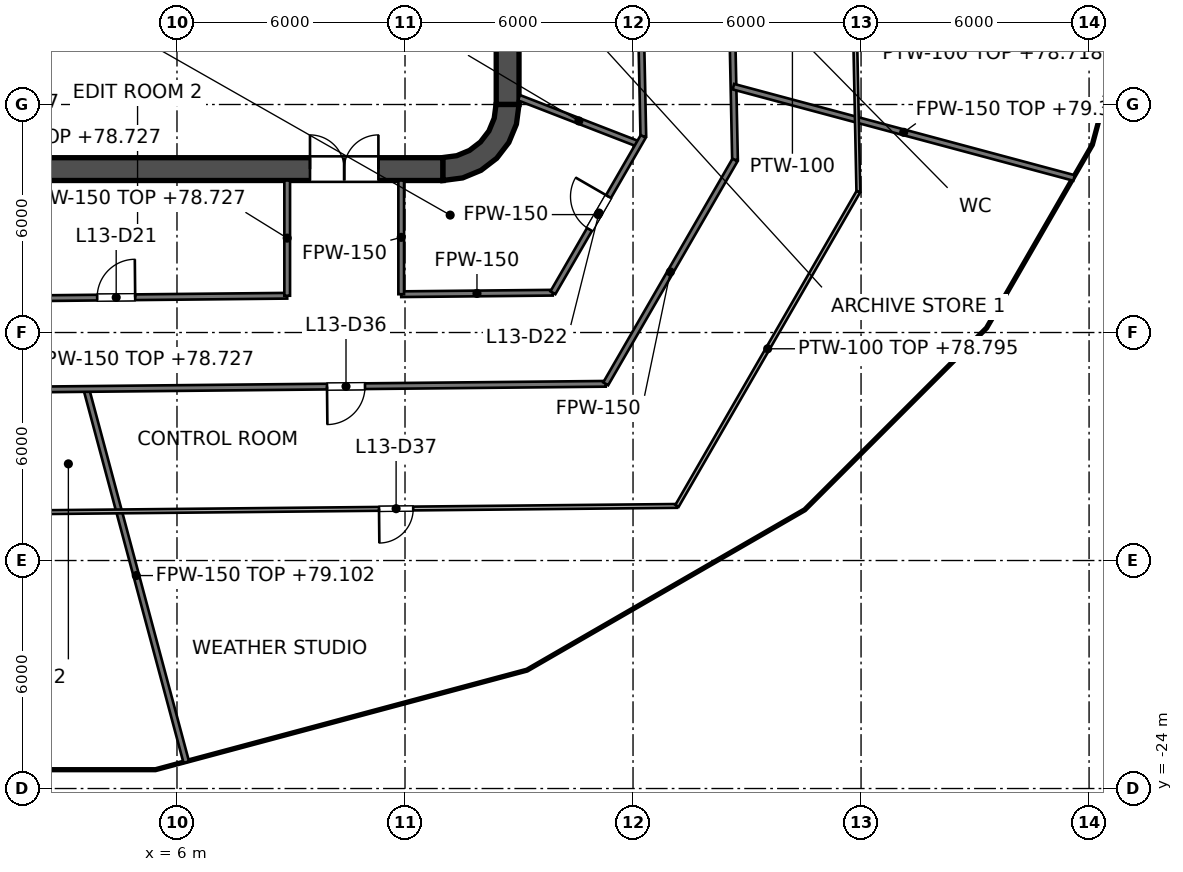
"""IFC4 building model, lengths in metres.
Left out: names, types, materials, properties, quantities, classifications, styles, units other than length and angle.
Written with IfcOpenShell. Run it as: python <this file> out.ifc"""

import sys

from ifc_helpers import new_model, si_unit, direction, frame, frame_2d, origin, place, context, subcontext, project, spatial, polyline, rectangle, outline, extrude, element, fill, save


model = new_model("IFC4")
c1 = context("Model", 3, precision=1e-05, world=origin(), true_north=direction((0.0, 1.0)))
c2 = subcontext(c1, "Body", "Model", "MODEL_VIEW")
j1 = project(units=[si_unit("LENGTHUNIT", "METRE"), si_unit("PLANEANGLEUNIT", "RADIAN")], contexts=[c1])
p1 = place(None, origin())
s1 = spatial("IfcSite", under=j1, at=p1, CompositionType="ELEMENT")
p2 = place(p1, origin())
s2 = spatial("IfcBuilding", under=s1, at=p2, CompositionType="ELEMENT")
p3 = place(p2, frame((0.0, 0.0, 75.6)))
s3 = spatial("IfcBuildingStorey", under=s2, at=p3, CompositionType="ELEMENT", Elevation=75.6)
p4 = place(p3, frame((-13.0, -7.7, 0.0), z_axis=(0.0, 0.0, 1.0), x_axis=(1.0, 0.0, 0.0)))
e1 = element("IfcWall", 1, at=p4, inside=s3, PredefinedType="SHEAR", context=c2, shape_type="SweptSolid", body=[
    extrude(rectangle(XDim=26.0, YDim=0.6, at=frame_2d((13.0, 0.0))), origin(), (0.0, 0.0, 1.0), 4.2),
])
p5 = place(p4, frame((1.7, 0.0, 0.0)))
e2 = element("IfcOpeningElement", 2, at=p5, cuts=e1, PredefinedType="OPENING", context=c2, shape_type="SweptSolid", body=[
    extrude(rectangle(XDim=1.8, YDim=2.1, at=frame_2d((0.9, 1.05))), frame((0.0, 0.3, 0.0), z_axis=(0.0, -1.0, 0.0), x_axis=(1.0, 0.0, 0.0)), (0.0, 0.0, 1.0), 0.6),
])
p6 = place(p4, frame((22.5, 0.0, 0.0)))
e3 = element("IfcOpeningElement", 3, at=p6, cuts=e1, PredefinedType="OPENING", context=c2, shape_type="SweptSolid", body=[
    extrude(rectangle(XDim=1.8, YDim=2.1, at=frame_2d((0.9, 1.05))), frame((0.0, 0.3, 0.0), z_axis=(0.0, -1.0, 0.0), x_axis=(1.0, 0.0, 0.0)), (0.0, 0.0, 1.0), 0.6),
])
p7 = place(p3, frame((14.7, -6.0, 0.0), z_axis=(0.0, 0.0, 1.0), x_axis=(0.0, 1.0, 0.0)))
e4 = element("IfcWall", 4, at=p7, inside=s3, PredefinedType="SHEAR", context=c2, shape_type="SweptSolid", body=[
    extrude(rectangle(XDim=12.0, YDim=0.6, at=frame_2d((6.0, 0.0))), origin(), (0.0, 0.0, 1.0), 4.2),
])
p8 = place(p3, origin())
e5 = element("IfcWall", 5, at=p8, inside=s3, PredefinedType="SHEAR", context=c2, shape_type="SweptSolid", body=[
    extrude(outline(polyline([(15.0, -6.0), (14.395, -6.0), (14.347, -6.361), (14.208, -6.698), (13.986, -6.986), (13.698, -7.208), (13.361, -7.347), (13.0, -7.395), (13.0, -8.0), (13.518, -7.932), (14.0, -7.732), (14.414, -7.414), (14.732, -7.0), (14.932, -6.518), (15.0, -6.0)])), origin(), (0.0, 0.0, 1.0), 4.2),
])
p9 = place(p3, frame((9.0, -6.6, 0.0), z_axis=(0.0, 0.0, 1.0), x_axis=(0.0, 1.0, 0.0)))
e6 = element("IfcWall", 6, at=p9, inside=s3, PredefinedType="SOLIDWALL", context=c2, shape_type="SweptSolid", body=[
    extrude(rectangle(XDim=2.5, YDim=0.25, at=frame_2d((1.25, 0.0))), origin(), (0.0, 0.0, 1.0), 4.05),
])
p10 = place(p9, frame((0.65, 0.0, 0.0)))
e7 = element("IfcOpeningElement", 7, at=p10, cuts=e6, PredefinedType="OPENING", context=c2, shape_type="SweptSolid", body=[
    extrude(rectangle(XDim=1.2, YDim=2.1, at=frame_2d((0.6, 1.05))), frame((0.0, 0.125, 0.0), z_axis=(0.0, -1.0, 0.0), x_axis=(1.0, 0.0, 0.0)), (0.0, 0.0, 1.0), 0.25),
])
p11 = place(p3, frame((3.15, -6.6, 0.0), z_axis=(0.0, 0.0, 1.0), x_axis=(0.0, 1.0, 0.0)))
e8 = element("IfcWall", 8, at=p11, inside=s3, PredefinedType="SOLIDWALL", context=c2, shape_type="SweptSolid", body=[
    extrude(rectangle(XDim=2.5, YDim=0.25, at=frame_2d((1.25, 0.0))), origin(), (0.0, 0.0, 1.0), 4.05),
])
p12 = place(p3, frame((-9.125, -7.0, 0.0), z_axis=(0.0, 0.0, 1.0), x_axis=(1.0, 0.0, 0.0)))
e9 = element("IfcWall", 9, at=p12, inside=s3, PredefinedType="SOLIDWALL", context=c2, shape_type="SweptSolid", body=[
    extrude(rectangle(XDim=18.25, YDim=0.8, at=frame_2d((9.125, 0.0))), origin(), (0.0, 0.0, 1.0), 4.05),
])
p13 = place(p3, frame((11.8, -7.4, 0.0), z_axis=(0.0, 0.0, 1.0), x_axis=(0.0, 1.0, 0.0)))
e10 = element("IfcWall", 10, at=p13, inside=s3, PredefinedType="SOLIDWALL", context=c2, shape_type="SweptSolid", body=[
    extrude(rectangle(XDim=14.8, YDim=0.4, at=frame_2d((7.4, 0.0))), origin(), (0.0, 0.0, 1.0), 4.05),
])
p14 = place(p13, frame((11.2, 0.0, 0.0)))
e11 = element("IfcOpeningElement", 11, at=p14, cuts=e10, PredefinedType="OPENING", context=c2, shape_type="SweptSolid", body=[
    extrude(rectangle(XDim=1.1, YDim=2.1, at=frame_2d((0.55, 1.05))), frame((0.0, 0.2, 0.0), z_axis=(0.0, -1.0, 0.0), x_axis=(1.0, 0.0, 0.0)), (0.0, 0.0, 1.0), 0.4),
])
p15 = place(p13, frame((8.3, 0.0, 0.0)))
e12 = element("IfcOpeningElement", 12, at=p15, cuts=e10, PredefinedType="OPENING", context=c2, shape_type="SweptSolid", body=[
    extrude(rectangle(XDim=1.1, YDim=2.1, at=frame_2d((0.55, 1.05))), frame((0.0, 0.2, 0.0), z_axis=(0.0, -1.0, 0.0), x_axis=(1.0, 0.0, 0.0)), (0.0, 0.0, 1.0), 0.4),
])
p16 = place(p13, frame((5.4, 0.0, 0.0)))
e13 = element("IfcOpeningElement", 13, at=p16, cuts=e10, PredefinedType="OPENING", context=c2, shape_type="SweptSolid", body=[
    extrude(rectangle(XDim=1.1, YDim=2.1, at=frame_2d((0.55, 1.05))), frame((0.0, 0.2, 0.0), z_axis=(0.0, -1.0, 0.0), x_axis=(1.0, 0.0, 0.0)), (0.0, 0.0, 1.0), 0.4),
])
p17 = place(p13, frame((13.552, 0.0, 0.0)))
e14 = element("IfcOpeningElement", 14, at=p17, cuts=e10, PredefinedType="OPENING", context=c2, shape_type="SweptSolid", body=[
    extrude(rectangle(XDim=0.9, YDim=2.1, at=frame_2d((0.45, 1.05))), frame((0.0, 0.2, 0.0), z_axis=(0.0, -1.0, 0.0), x_axis=(1.0, 0.0, 0.0)), (0.0, 0.0, 1.0), 0.4),
])
p18 = place(p13, frame((0.347, 0.0, 0.0)))
e15 = element("IfcOpeningElement", 15, at=p18, cuts=e10, PredefinedType="OPENING", context=c2, shape_type="SweptSolid", body=[
    extrude(rectangle(XDim=0.9, YDim=2.1, at=frame_2d((0.45, 1.05))), frame((0.0, 0.2, 0.0), z_axis=(0.0, -1.0, 0.0), x_axis=(1.0, 0.0, 0.0)), (0.0, 0.0, 1.0), 0.4),
])
e16 = element("IfcWall", 16, at=p8, inside=s3, PredefinedType="SOLIDWALL", context=c2, shape_type="SweptSolid", body=[
    extrude(outline(polyline([(12.0, -5.675), (12.0, -5.925), (14.15, -5.925), (14.4, -5.925), (14.4, -5.675), (14.4, -3.025), (14.4, -2.775), (14.4, -0.125), (14.4, 0.125), (14.4, 2.775), (14.4, 3.025), (14.4, 5.675), (14.4, 5.925), (14.15, 5.925), (12.0, 5.925), (12.0, 5.675), (14.15, 5.675), (14.15, 3.025), (12.0, 3.025), (12.0, 2.775), (14.15, 2.775), (14.15, 0.125), (12.0, 0.125), (12.0, -0.125), (14.15, -0.125), (14.15, -2.775), (12.0, -2.775), (12.0, -3.025), (14.15, -3.025), (14.15, -5.675), (12.0, -5.675)])), origin(), (0.0, 0.0, 1.0), 4.05),
])
p19 = place(p3, frame((17.944, 8.899, 0.0), z_axis=(0.0, 0.0, 1.0), x_axis=(0.020766159807, -0.999784360053, 0.0)))
e17 = element("IfcWall", 17, at=p19, inside=s3, PredefinedType="PARTITIONING", context=c2, shape_type="SweptSolid", body=[
    extrude(rectangle(XDim=15.742, YDim=0.15, at=frame_2d((7.871, 0.0))), origin(), (0.0, 0.0, 1.0), 3.118),
])
p20 = place(p19, frame((11.72, 0.0, 0.0)))
e18 = element("IfcOpeningElement", 18, at=p20, cuts=e17, PredefinedType="OPENING", context=c2, shape_type="SweptSolid", body=[
    extrude(rectangle(XDim=1.0, YDim=2.1, at=frame_2d((0.5, 1.05))), frame((0.0, 0.075, 0.0), z_axis=(0.0, -1.0, 0.0), x_axis=(1.0, 0.0, 0.0)), (0.0, 0.0, 1.0), 0.15),
])
p21 = place(p19, frame((7.533, 0.0, 0.0)))
e19 = element("IfcOpeningElement", 19, at=p21, cuts=e17, PredefinedType="OPENING", context=c2, shape_type="SweptSolid", body=[
    extrude(rectangle(XDim=1.0, YDim=2.1, at=frame_2d((0.5, 1.05))), frame((0.0, 0.075, 0.0), z_axis=(0.0, -1.0, 0.0), x_axis=(1.0, 0.0, 0.0)), (0.0, 0.0, 1.0), 0.15),
])
p22 = place(p3, frame((20.314, 10.301, 0.0), z_axis=(0.0, 0.0, 1.0), x_axis=(0.020779303351, -0.999784086967, 0.0)))
e20 = element("IfcWall", 20, at=p22, inside=s3, PredefinedType="PARTITIONING", context=c2, shape_type="SweptSolid", body=[
    extrude(rectangle(XDim=17.765, YDim=0.15, at=frame_2d((8.882, 0.0))), origin(), (0.0, 0.0, 1.0), 3.118),
])
p23 = place(p22, frame((13.714, 0.0, 0.0)))
e21 = element("IfcOpeningElement", 21, at=p23, cuts=e20, PredefinedType="OPENING", context=c2, shape_type="SweptSolid", body=[
    extrude(rectangle(XDim=1.0, YDim=2.1, at=frame_2d((0.5, 1.05))), frame((0.0, 0.075, 0.0), z_axis=(0.0, -1.0, 0.0), x_axis=(1.0, 0.0, 0.0)), (0.0, 0.0, 1.0), 0.15),
])
p24 = place(p22, frame((5.797, 0.0, 0.0)))
e22 = element("IfcOpeningElement", 22, at=p24, cuts=e20, PredefinedType="OPENING", context=c2, shape_type="SweptSolid", body=[
    extrude(rectangle(XDim=1.0, YDim=2.1, at=frame_2d((0.5, 1.05))), frame((0.0, 0.075, 0.0), z_axis=(0.0, -1.0, 0.0), x_axis=(1.0, 0.0, 0.0)), (0.0, 0.0, 1.0), 0.15),
])
p25 = place(p3, frame((3.613, -13.485, 0.0), z_axis=(0.0, 0.0, 1.0), x_axis=(0.258799691225, -0.965931011937, 0.0)))
e23 = element("IfcWall", 23, at=p25, inside=s3, PredefinedType="PARTITIONING", context=c2, shape_type="SweptSolid", body=[
    extrude(rectangle(XDim=10.168, YDim=0.15, at=frame_2d((5.084, 0.0))), origin(), (0.0, 0.0, 1.0), 3.502),
])
p26 = place(p3, frame((15.0, -5.822, 0.0), z_axis=(0.0, 0.0, 1.0), x_axis=(0.932341922019, -0.36157784839, 0.0)))
e24 = element("IfcWall", 24, at=p26, inside=s3, PredefinedType="PARTITIONING", context=c2, shape_type="SweptSolid", body=[
    extrude(rectangle(XDim=3.379, YDim=0.15, at=frame_2d((1.689, 0.0))), origin(), (0.0, 0.0, 1.0), 4.05),
])
p27 = place(p3, frame((20.641, -5.531, 0.0), z_axis=(0.0, 0.0, 1.0), x_axis=(0.965912819534, -0.258867582095, 0.0)))
e25 = element("IfcWall", 25, at=p27, inside=s3, PredefinedType="PARTITIONING", context=c2, shape_type="SweptSolid", body=[
    extrude(rectangle(XDim=9.28, YDim=0.15, at=frame_2d((4.64, 0.0))), origin(), (0.0, 0.0, 1.0), 3.727),
])
p28 = place(p3, frame((-14.097, -13.661, 0.0), z_axis=(0.0, 0.0, 1.0), x_axis=(0.999950951425, 0.009904279054, 0.0)))
e26 = element("IfcWall", 26, at=p28, inside=s3, PredefinedType="PARTITIONING", context=c2, shape_type="SweptSolid", body=[
    extrude(rectangle(XDim=31.379, YDim=0.15, at=frame_2d((15.69, 0.0))), origin(), (0.0, 0.0, 1.0), 3.127),
])
p29 = place(p28, frame((7.45, 0.0, 0.0)))
e27 = element("IfcOpeningElement", 27, at=p29, cuts=e26, PredefinedType="OPENING", context=c2, shape_type="SweptSolid", body=[
    extrude(rectangle(XDim=1.0, YDim=2.1, at=frame_2d((0.5, 1.05))), frame((0.0, 0.075, 0.0), z_axis=(0.0, -1.0, 0.0), x_axis=(1.0, 0.0, 0.0)), (0.0, 0.0, 1.0), 0.15),
])
p30 = place(p28, frame((14.692, 0.0, 0.0)))
e28 = element("IfcOpeningElement", 28, at=p30, cuts=e26, PredefinedType="OPENING", context=c2, shape_type="SweptSolid", body=[
    extrude(rectangle(XDim=1.0, YDim=2.1, at=frame_2d((0.5, 1.05))), frame((0.0, 0.075, 0.0), z_axis=(0.0, -1.0, 0.0), x_axis=(1.0, 0.0, 0.0)), (0.0, 0.0, 1.0), 0.15),
])
p31 = place(p28, frame((24.046, 0.0, 0.0)))
e29 = element("IfcOpeningElement", 29, at=p31, cuts=e26, PredefinedType="OPENING", context=c2, shape_type="SweptSolid", body=[
    extrude(rectangle(XDim=1.0, YDim=2.1, at=frame_2d((0.5, 1.05))), frame((0.0, 0.075, 0.0), z_axis=(0.0, -1.0, 0.0), x_axis=(1.0, 0.0, 0.0)), (0.0, 0.0, 1.0), 0.15),
])
p32 = place(p3, frame((-8.9, -11.209, 0.0), z_axis=(0.0, 0.0, 1.0), x_axis=(0.999950969978, 0.009902405776, 0.0)))
e30 = element("IfcWall", 30, at=p32, inside=s3, PredefinedType="PARTITIONING", context=c2, shape_type="SweptSolid", body=[
    extrude(rectangle(XDim=17.801, YDim=0.15, at=frame_2d((8.9, 0.0))), origin(), (0.0, 0.0, 1.0), 3.127),
])
p33 = place(p32, frame((7.7, 0.0, 0.0)))
e31 = element("IfcOpeningElement", 31, at=p33, cuts=e30, PredefinedType="OPENING", context=c2, shape_type="SweptSolid", body=[
    extrude(rectangle(XDim=1.0, YDim=2.1, at=frame_2d((0.5, 1.05))), frame((0.0, 0.075, 0.0), z_axis=(0.0, -1.0, 0.0), x_axis=(1.0, 0.0, 0.0)), (0.0, 0.0, 1.0), 0.15),
])
p34 = place(p32, frame((12.801, 0.0, 0.0)))
e32 = element("IfcOpeningElement", 32, at=p34, cuts=e30, PredefinedType="OPENING", context=c2, shape_type="SweptSolid", body=[
    extrude(rectangle(XDim=1.0, YDim=2.1, at=frame_2d((0.5, 1.05))), frame((0.0, 0.075, 0.0), z_axis=(0.0, -1.0, 0.0), x_axis=(1.0, 0.0, 0.0)), (0.0, 0.0, 1.0), 0.15),
])
p35 = place(p3, frame((11.9, -10.992, 0.0), z_axis=(0.0, 0.0, 1.0), x_axis=(0.999950802569, 0.009919296431, 0.0)))
e33 = element("IfcWall", 33, at=p35, inside=s3, PredefinedType="PARTITIONING", context=c2, shape_type="SweptSolid", body=[
    extrude(rectangle(XDim=3.987, YDim=0.15, at=frame_2d((1.994, 0.0))), origin(), (0.0, 0.0, 1.0), 3.195),
])
p36 = place(p3, frame((17.281, -13.35, 0.0), z_axis=(0.0, 0.0, 1.0), x_axis=(0.500235133997, 0.865889606541, 0.0)))
e34 = element("IfcWall", 34, at=p36, inside=s3, PredefinedType="PARTITIONING", context=c2, shape_type="SweptSolid", body=[
    extrude(rectangle(XDim=6.801, YDim=0.15, at=frame_2d((3.4, 0.0))), origin(), (0.0, 0.0, 1.0), 3.195),
])
p37 = place(p3, frame((15.892, -10.954, 0.0), z_axis=(0.0, 0.0, 1.0), x_axis=(0.50019540779, 0.865912555646, 0.0)))
e35 = element("IfcWall", 35, at=p37, inside=s3, PredefinedType="PARTITIONING", context=c2, shape_type="SweptSolid", body=[
    extrude(rectangle(XDim=4.751, YDim=0.15, at=frame_2d((2.375, 0.0))), origin(), (0.0, 0.0, 1.0), 3.195),
])
p38 = place(p37, frame((1.924, 0.0, 0.0)))
e36 = element("IfcOpeningElement", 36, at=p38, cuts=e35, PredefinedType="OPENING", context=c2, shape_type="SweptSolid", body=[
    extrude(rectangle(XDim=1.0, YDim=2.1, at=frame_2d((0.5, 1.05))), frame((0.0, 0.075, 0.0), z_axis=(0.0, -1.0, 0.0), x_axis=(1.0, 0.0, 0.0)), (0.0, 0.0, 1.0), 0.15),
])
p39 = place(p3, frame((11.9, -10.992, 0.0), z_axis=(0.0, 0.0, 1.0), x_axis=(0.0, 1.0, 0.0)))
e37 = element("IfcWall", 37, at=p39, inside=s3, PredefinedType="PARTITIONING", context=c2, shape_type="SweptSolid", body=[
    extrude(rectangle(XDim=2.992, YDim=0.15, at=frame_2d((1.496, 0.0))), origin(), (0.0, 0.0, 1.0), 3.195),
])
p40 = place(p3, frame((8.9, -11.032, 0.0), z_axis=(0.0, 0.0, 1.0), x_axis=(0.0, 1.0, 0.0)))
e38 = element("IfcWall", 38, at=p40, inside=s3, PredefinedType="PARTITIONING", context=c2, shape_type="SweptSolid", body=[
    extrude(rectangle(XDim=3.032, YDim=0.15, at=frame_2d((1.516, 0.0))), origin(), (0.0, 0.0, 1.0), 3.127),
])
p41 = place(p3, frame((23.629, 6.283, 0.0), z_axis=(0.0, 0.0, 1.0), x_axis=(0.020596229696, -0.999787875163, 0.0)))
e39 = element("IfcWall", 39, at=p41, inside=s3, PredefinedType="PARTITIONING", context=c2, shape_type="SweptSolid", body=[
    extrude(rectangle(XDim=14.58, YDim=0.1, at=frame_2d((7.29, 0.0))), origin(), (0.0, 0.0, 1.0), 3.118),
])
p42 = place(p41, frame((4.424, 0.0, 0.0)))
e40 = element("IfcOpeningElement", 40, at=p42, cuts=e39, PredefinedType="OPENING", context=c2, shape_type="SweptSolid", body=[
    extrude(rectangle(XDim=0.9, YDim=2.1, at=frame_2d((0.45, 1.05))), frame((0.0, 0.05, 0.0), z_axis=(0.0, -1.0, 0.0), x_axis=(1.0, 0.0, 0.0)), (0.0, 0.0, 1.0), 0.1),
])
p43 = place(p3, frame((-14.724, -16.897, 0.0), z_axis=(0.0, 0.0, 1.0), x_axis=(0.999951488976, 0.00984985758, 0.0)))
e41 = element("IfcWall", 41, at=p43, inside=s3, PredefinedType="PARTITIONING", context=c2, shape_type="SweptSolid", body=[
    extrude(rectangle(XDim=33.883, YDim=0.1, at=frame_2d((16.941, 0.0))), origin(), (0.0, 0.0, 1.0), 3.127),
])
p44 = place(p43, frame((6.095, 0.0, 0.0)))
e42 = element("IfcOpeningElement", 42, at=p44, cuts=e41, PredefinedType="OPENING", context=c2, shape_type="SweptSolid", body=[
    extrude(rectangle(XDim=1.8, YDim=2.1, at=frame_2d((0.9, 1.05))), frame((0.0, 0.05, 0.0), z_axis=(0.0, -1.0, 0.0), x_axis=(1.0, 0.0, 0.0)), (0.0, 0.0, 1.0), 0.1),
])
p45 = place(p43, frame((26.041, 0.0, 0.0)))
e43 = element("IfcOpeningElement", 43, at=p45, cuts=e41, PredefinedType="OPENING", context=c2, shape_type="SweptSolid", body=[
    extrude(rectangle(XDim=0.9, YDim=2.1, at=frame_2d((0.45, 1.05))), frame((0.0, 0.05, 0.0), z_axis=(0.0, -1.0, 0.0), x_axis=(1.0, 0.0, 0.0)), (0.0, 0.0, 1.0), 0.1),
])
p46 = place(p3, frame((19.157, -16.562, 0.0), z_axis=(0.0, 0.0, 1.0), x_axis=(0.499904728141, 0.866080402031, 0.0)))
e44 = element("IfcWall", 44, at=p46, inside=s3, PredefinedType="PARTITIONING", context=c2, shape_type="SweptSolid", body=[
    extrude(rectangle(XDim=9.546, YDim=0.1, at=frame_2d((4.773, 0.0))), origin(), (0.0, 0.0, 1.0), 3.195),
])
p47 = place(p10, origin())
e45 = element("IfcDoor", 45, at=p47, inside=s3, OperationType="SINGLE_SWING_LEFT", PredefinedType="DOOR", context=c2, shape_type="SweptSolid", body=[
    extrude(rectangle(XDim=1.2, YDim=2.1, at=frame_2d((0.6, 1.05))), frame((0.0, 0.025, 0.0), z_axis=(0.0, -1.0, 0.0), x_axis=(1.0, 0.0, 0.0)), (0.0, 0.0, 1.0), 0.05),
])
fill(e7, e45)
p48 = place(p18, origin())
e46 = element("IfcDoor", 46, at=p48, inside=s3, OperationType="SINGLE_SWING_RIGHT", PredefinedType="DOOR", context=c2, shape_type="SweptSolid", body=[
    extrude(rectangle(XDim=0.9, YDim=2.1, at=frame_2d((0.45, 1.05))), frame((0.0, 0.025, 0.0), z_axis=(0.0, -1.0, 0.0), x_axis=(1.0, 0.0, 0.0)), (0.0, 0.0, 1.0), 0.05),
])
fill(e15, e46)
p49 = place(p6, origin())
e47 = element("IfcDoor", 47, at=p49, inside=s3, OperationType="DOUBLE_DOOR_SINGLE_SWING", PredefinedType="DOOR", context=c2, shape_type="SweptSolid", body=[
    extrude(rectangle(XDim=1.8, YDim=2.1, at=frame_2d((0.9, 1.05))), frame((0.0, 0.025, 0.0), z_axis=(0.0, -1.0, 0.0), x_axis=(1.0, 0.0, 0.0)), (0.0, 0.0, 1.0), 0.05),
])
fill(e3, e47)
p50 = place(p34, origin())
e48 = element("IfcDoor", 48, at=p50, inside=s3, OperationType="SINGLE_SWING_RIGHT", PredefinedType="DOOR", context=c2, shape_type="SweptSolid", body=[
    extrude(rectangle(XDim=1.0, YDim=2.1, at=frame_2d((0.5, 1.05))), frame((0.0, 0.025, 0.0), z_axis=(0.0, -1.0, 0.0), x_axis=(1.0, 0.0, 0.0)), (0.0, 0.0, 1.0), 0.05),
])
fill(e32, e48)
p51 = place(p38, origin())
e49 = element("IfcDoor", 49, at=p51, inside=s3, OperationType="SINGLE_SWING_RIGHT", PredefinedType="DOOR", context=c2, shape_type="SweptSolid", body=[
    extrude(rectangle(XDim=1.0, YDim=2.1, at=frame_2d((0.5, 1.05))), frame((0.0, 0.025, 0.0), z_axis=(0.0, -1.0, 0.0), x_axis=(1.0, 0.0, 0.0)), (0.0, 0.0, 1.0), 0.05),
])
fill(e36, e49)
p52 = place(p31, origin())
e50 = element("IfcDoor", 50, at=p52, inside=s3, OperationType="SINGLE_SWING_LEFT", PredefinedType="DOOR", context=c2, shape_type="SweptSolid", body=[
    extrude(rectangle(XDim=1.0, YDim=2.1, at=frame_2d((0.5, 1.05))), frame((0.0, 0.025, 0.0), z_axis=(0.0, -1.0, 0.0), x_axis=(1.0, 0.0, 0.0)), (0.0, 0.0, 1.0), 0.05),
])
fill(e29, e50)
p53 = place(p45, origin())
e51 = element("IfcDoor", 51, at=p53, inside=s3, OperationType="SINGLE_SWING_LEFT", PredefinedType="DOOR", context=c2, shape_type="SweptSolid", body=[
    extrude(rectangle(XDim=0.9, YDim=2.1, at=frame_2d((0.45, 1.05))), frame((0.0, 0.025, 0.0), z_axis=(0.0, -1.0, 0.0), x_axis=(1.0, 0.0, 0.0)), (0.0, 0.0, 1.0), 0.05),
])
fill(e43, e51)
save(model, sys.argv[1])
